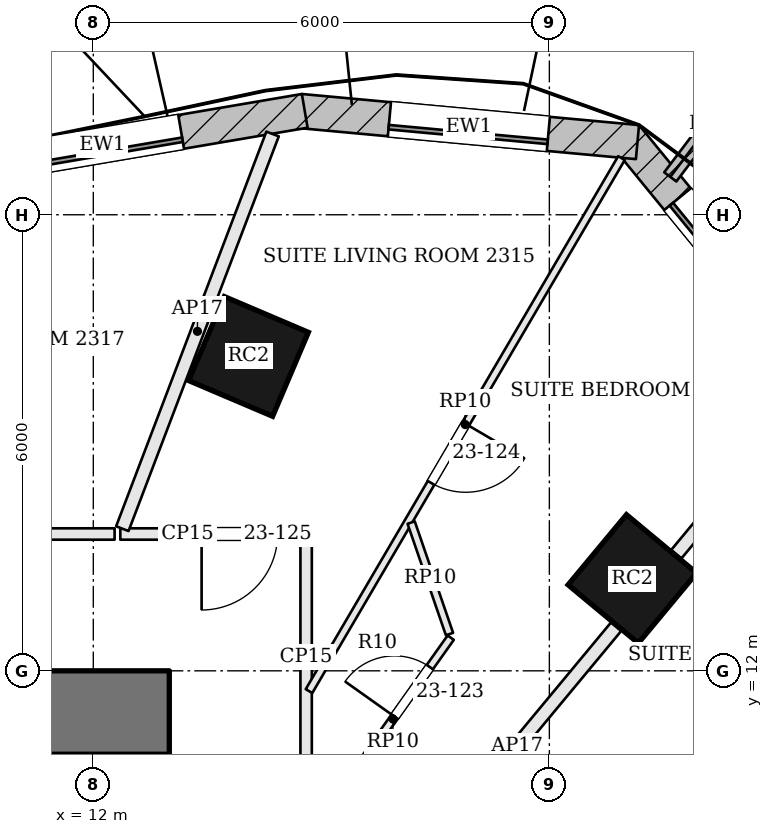
"""IFC4 building model, lengths in metres.
Left out: names, types, materials, properties, quantities, classifications, styles, units other than length and angle.
Written with IfcOpenShell. Run it as: python <this file> out.ifc"""

import sys

from ifc_helpers import new_model, si_unit, direction, frame, frame_2d, origin, origin_2d, place, context, subcontext, project, spatial, rectangle, extrude, element, fill, save


model = new_model("IFC4")
c1 = context("Model", 3, precision=1e-05, world=origin(), true_north=direction((0.0, 1.0)))
c2 = subcontext(c1, "Body", "Model", "MODEL_VIEW")
j1 = project(units=[si_unit("LENGTHUNIT", "METRE"), si_unit("PLANEANGLEUNIT", "RADIAN")], contexts=[c1])
p1 = place(None, origin())
s1 = spatial("IfcSite", under=j1, at=p1, CompositionType="ELEMENT")
p2 = place(p1, origin())
s2 = spatial("IfcBuilding", under=s1, at=p2, CompositionType="ELEMENT")
p3 = place(p2, frame((0.0, 0.0, 99.6)))
s3 = spatial("IfcBuildingStorey", under=s2, at=p3, CompositionType="ELEMENT", Elevation=99.6)
p4 = place(p3, frame((-13.0, 11.45, 0.0), z_axis=(0.0, 0.0, 1.0), x_axis=(1.0, 0.0, 0.0)))
e1 = element("IfcWall", 1, at=p4, inside=s3, PredefinedType="SHEAR", context=c2, shape_type="SweptSolid", body=[
    extrude(rectangle(XDim=26.0, YDim=1.1, at=frame_2d((13.0, 0.0))), origin(), (0.0, 0.0, 1.0), 3.6),
])
p5 = place(p4, frame((8.825, 0.0, 0.0)))
e2 = element("IfcOpeningElement", 2, at=p5, cuts=e1, PredefinedType="OPENING", context=c2, shape_type="SweptSolid", body=[
    extrude(rectangle(XDim=1.0, YDim=2.1, at=frame_2d((0.5, 1.05))), frame((0.0, 0.56, 0.0), z_axis=(0.0, -1.0, 0.0), x_axis=(1.0, 0.0, 0.0)), (0.0, 0.0, 1.0), 1.12),
])
p6 = place(p4, frame((12.1, 0.0, 0.0)))
e3 = element("IfcOpeningElement", 3, at=p6, cuts=e1, PredefinedType="OPENING", context=c2, shape_type="SweptSolid", body=[
    extrude(rectangle(XDim=1.0, YDim=2.1, at=frame_2d((0.5, 1.05))), frame((0.0, 0.56, 0.0), z_axis=(0.0, -1.0, 0.0), x_axis=(1.0, 0.0, 0.0)), (0.0, 0.0, 1.0), 1.12),
])
p7 = place(p4, frame((15.125, 0.0, 0.0)))
e4 = element("IfcOpeningElement", 4, at=p7, cuts=e1, PredefinedType="OPENING", context=c2, shape_type="SweptSolid", body=[
    extrude(rectangle(XDim=0.7, YDim=2.1, at=frame_2d((0.35, 1.05))), frame((0.0, 0.56, 0.0), z_axis=(0.0, -1.0, 0.0), x_axis=(1.0, 0.0, 0.0)), (0.0, 0.0, 1.0), 1.12),
])
p8 = place(p4, frame((16.65, 0.0, 0.0)))
e5 = element("IfcOpeningElement", 5, at=p8, cuts=e1, PredefinedType="OPENING", context=c2, shape_type="SweptSolid", body=[
    extrude(rectangle(XDim=0.9, YDim=2.1, at=frame_2d((0.45, 1.05))), frame((0.0, 0.56, 0.0), z_axis=(0.0, -1.0, 0.0), x_axis=(1.0, 0.0, 0.0)), (0.0, 0.0, 1.0), 1.12),
])
p9 = place(p3, frame((12.45, -1.9, 0.0), z_axis=(0.0, 0.0, 1.0), x_axis=(0.0, 1.0, 0.0)))
e6 = element("IfcWall", 6, at=p9, inside=s3, PredefinedType="SHEAR", context=c2, shape_type="SweptSolid", body=[
    extrude(rectangle(XDim=12.8, YDim=1.1, at=frame_2d((6.4, 0.0))), origin(), (0.0, 0.0, 1.0), 3.6),
])
p10 = place(p9, frame((7.1, 0.0, 0.0)))
e7 = element("IfcOpeningElement", 7, at=p10, cuts=e6, PredefinedType="OPENING", context=c2, shape_type="SweptSolid", body=[
    extrude(rectangle(XDim=1.8, YDim=2.1, at=frame_2d((0.9, 1.05))), frame((0.0, 0.56, 0.0), z_axis=(0.0, -1.0, 0.0), x_axis=(1.0, 0.0, 0.0)), (0.0, 0.0, 1.0), 1.12),
])
for number, where, z_axis, x_axis in (
    (8, (19.092, 13.209, 0.0), (0.0, 0.0, 1.0), (-0.769, 0.639, 0.0)),
    (9, (14.042, 16.136, 0.0), (0.0, 0.0, 1.0), (-0.92, 0.392, 0.0)),
):
    element("IfcColumn", number, at=place(p3, frame(where, z_axis=z_axis, x_axis=x_axis)), inside=s3, PredefinedType="COLUMN", context=c2, shape_type="SweptSolid", body=[
        extrude(rectangle(XDim=1.2, YDim=1.2, at=origin_2d()), origin(), (0.0, 0.0, 1.0), 3.6),
    ])
p11 = place(p3, frame((21.696, 15.748, 0.0), z_axis=(0.0, 0.0, 1.0), x_axis=(-0.632968710519, 0.774177377288, 0.0)))
e10 = element("IfcWall", 10, at=p11, inside=s3, PredefinedType="SOLIDWALL", context=c2, shape_type="SweptSolid", body=[
    extrude(rectangle(XDim=4.25, YDim=0.45, at=frame_2d((2.125, 0.0))), origin(), (0.0, 0.0, 1.0), 3.4),
])
p12 = place(p11, frame((1.075, 0.0, 0.9)))
e11 = element("IfcOpeningElement", 11, at=p12, cuts=e10, PredefinedType="OPENING", context=c2, shape_type="SweptSolid", body=[
    extrude(rectangle(XDim=2.1, YDim=2.0, at=frame_2d((1.05, 1.0))), frame((0.0, 0.235, 0.0), z_axis=(0.0, -1.0, 0.0), x_axis=(1.0, 0.0, 0.0)), (0.0, 0.0, 1.0), 0.47),
])
p13 = place(p3, frame((19.159, 18.956, 0.0), z_axis=(0.0, 0.0, 1.0), x_axis=(-0.995777399421, 0.091800712424, 0.0)))
e12 = element("IfcWall", 12, at=p13, inside=s3, PredefinedType="SOLIDWALL", context=c2, shape_type="SweptSolid", body=[
    extrude(rectangle(XDim=4.455, YDim=0.45, at=frame_2d((2.227, 0.0))), origin(), (0.0, 0.0, 1.0), 3.4),
])
p14 = place(p13, frame((1.177, 0.0, 0.9)))
e13 = element("IfcOpeningElement", 13, at=p14, cuts=e12, PredefinedType="OPENING", context=c2, shape_type="SweptSolid", body=[
    extrude(rectangle(XDim=2.1, YDim=2.0, at=frame_2d((1.05, 1.0))), frame((0.0, 0.235, 0.0), z_axis=(0.0, -1.0, 0.0), x_axis=(1.0, 0.0, 0.0)), (0.0, 0.0, 1.0), 0.47),
])
p15 = place(p3, frame((14.782, 19.367, 0.0), z_axis=(0.0, 0.0, 1.0), x_axis=(-0.98585584667, -0.167595493934, 0.0)))
e14 = element("IfcWall", 14, at=p15, inside=s3, PredefinedType="SOLIDWALL", context=c2, shape_type="SweptSolid", body=[
    extrude(rectangle(XDim=5.399, YDim=0.45, at=frame_2d((2.699, 0.0))), origin(), (0.0, 0.0, 1.0), 3.4),
])
p16 = place(p15, frame((1.649, 0.0, 0.9)))
e15 = element("IfcOpeningElement", 15, at=p16, cuts=e14, PredefinedType="OPENING", context=c2, shape_type="SweptSolid", body=[
    extrude(rectangle(XDim=2.1, YDim=2.0, at=frame_2d((1.05, 1.0))), frame((0.0, 0.235, 0.0), z_axis=(0.0, -1.0, 0.0), x_axis=(1.0, 0.0, 0.0)), (0.0, 0.0, 1.0), 0.47),
])
p17 = place(p3, frame((19.591, 18.498, 0.0), z_axis=(0.0, 0.0, 1.0), x_axis=(0.603387525063, 0.797448114048, 0.0)))
e16 = element("IfcWall", 16, at=p17, inside=s3, PredefinedType="SOLIDWALL", context=c2, shape_type="SweptSolid", body=[
    extrude(rectangle(XDim=1.75, YDim=0.2, at=frame_2d((0.875, 0.0))), origin(), (0.0, 0.0, 1.0), 3.4),
])
p18 = place(p3, frame((11.9, 10.75, 0.0), z_axis=(0.0, 0.0, 1.0), x_axis=(-1.0, 0.0, 0.0)))
e17 = element("IfcWall", 17, at=p18, inside=s3, PredefinedType="SOLIDWALL", context=c2, shape_type="SweptSolid", body=[
    extrude(rectangle(XDim=6.8, YDim=0.3, at=frame_2d((3.4, 0.0))), origin(), (0.0, 0.0, 1.0), 3.4),
])
p19 = place(p3, frame((21.453, 15.682, 0.0), z_axis=(0.0, 0.0, 1.0), x_axis=(-0.638728991457, -0.769431787407, 0.0)))
e18 = element("IfcWall", 18, at=p19, inside=s3, PredefinedType="PARTITIONING", context=c2, shape_type="SweptSolid", body=[
    extrude(rectangle(XDim=2.791, YDim=0.175, at=frame_2d((1.396, 0.0))), origin(), (0.0, 0.0, 1.0), 2.784),
])
p20 = place(p3, frame((18.878, 12.58, 0.0), z_axis=(0.0, 0.0, 1.0), x_axis=(-0.638737279584, -0.769424907102, 0.0)))
e19 = element("IfcWall", 19, at=p20, inside=s3, PredefinedType="PARTITIONING", context=c2, shape_type="SweptSolid", body=[
    extrude(rectangle(XDim=4.069, YDim=0.175, at=frame_2d((2.034, 0.0))), origin(), (0.0, 0.0, 1.0), 2.784),
])
p21 = place(p3, frame((14.8, 10.572, 0.0), z_axis=(0.0, 0.0, 1.0), x_axis=(0.0, 1.0, 0.0)))
e20 = element("IfcWall", 20, at=p21, inside=s3, PredefinedType="PARTITIONING", context=c2, shape_type="SweptSolid", body=[
    extrude(rectangle(XDim=3.228, YDim=0.15, at=frame_2d((1.614, 0.0))), origin(), (0.0, 0.0, 1.0), 2.784),
])
p22 = place(p3, frame((14.725, 13.8, 0.0), z_axis=(0.0, 0.0, 1.0), x_axis=(-1.0, 0.0, 0.0)))
e21 = element("IfcWall", 21, at=p22, inside=s3, PredefinedType="PARTITIONING", context=c2, shape_type="SweptSolid", body=[
    extrude(rectangle(XDim=2.37, YDim=0.15, at=frame_2d((1.185, 0.0))), origin(), (0.0, 0.0, 1.0), 2.784),
])
p23 = place(p22, frame((0.3, 0.0, 0.0)))
e22 = element("IfcOpeningElement", 22, at=p23, cuts=e21, PredefinedType="OPENING", context=c2, shape_type="SweptSolid", body=[
    extrude(rectangle(XDim=1.0, YDim=2.1, at=frame_2d((0.5, 1.05))), frame((0.0, 0.085, 0.0), z_axis=(0.0, -1.0, 0.0), x_axis=(1.0, 0.0, 0.0)), (0.0, 0.0, 1.0), 0.17),
])
p24 = place(p3, frame((14.359, 19.063, 0.0), z_axis=(0.0, 0.0, 1.0), x_axis=(-0.355746808742, -0.934582370939, 0.0)))
e23 = element("IfcWall", 23, at=p24, inside=s3, PredefinedType="PARTITIONING", context=c2, shape_type="SweptSolid", body=[
    extrude(rectangle(XDim=5.556, YDim=0.175, at=frame_2d((2.778, 0.0))), origin(), (0.0, 0.0, 1.0), 2.784),
])
p25 = place(p3, frame((12.281, 13.8, 0.0), z_axis=(0.0, 0.0, 1.0), x_axis=(-1.0, 0.0, 0.0)))
e24 = element("IfcWall", 24, at=p25, inside=s3, PredefinedType="PARTITIONING", context=c2, shape_type="SweptSolid", body=[
    extrude(rectangle(XDim=12.338, YDim=0.15, at=frame_2d((6.169, 0.0))), origin(), (0.0, 0.0, 1.0), 2.784),
])
p26 = place(p25, frame((9.043, 0.0, 0.0)))
e25 = element("IfcOpeningElement", 25, at=p26, cuts=e24, PredefinedType="OPENING", context=c2, shape_type="SweptSolid", body=[
    extrude(rectangle(XDim=1.0, YDim=2.1, at=frame_2d((0.5, 1.05))), frame((0.0, 0.085, 0.0), z_axis=(0.0, -1.0, 0.0), x_axis=(1.0, 0.0, 0.0)), (0.0, 0.0, 1.0), 0.17),
])
p27 = place(p3, frame((22.414, 11.576, 0.0), z_axis=(0.0, 0.0, 1.0), x_axis=(-0.77113161257, -0.636675769992, 0.0)))
e26 = element("IfcWall", 26, at=p27, inside=s3, PredefinedType="PARTITIONING", context=c2, shape_type="SweptSolid", body=[
    extrude(rectangle(XDim=5.89, YDim=0.1, at=frame_2d((2.945, 0.0))), origin(), (0.0, 0.0, 1.0), 2.784),
])
p28 = place(p27, frame((1.815, 0.0, 0.0)))
e27 = element("IfcOpeningElement", 27, at=p28, cuts=e26, PredefinedType="OPENING", context=c2, shape_type="SweptSolid", body=[
    extrude(rectangle(XDim=0.9, YDim=2.4, at=frame_2d((0.45, 1.2))), frame((0.0, 0.06, 0.0), z_axis=(0.0, -1.0, 0.0), x_axis=(1.0, 0.0, 0.0)), (0.0, 0.0, 1.0), 0.12),
])
p29 = place(p3, frame((18.949, 18.745, 0.0), z_axis=(0.0, 0.0, 1.0), x_axis=(-0.505754187447, -0.862677634972, 0.0)))
e28 = element("IfcWall", 28, at=p29, inside=s3, PredefinedType="PARTITIONING", context=c2, shape_type="SweptSolid", body=[
    extrude(rectangle(XDim=8.128, YDim=0.1, at=frame_2d((4.064, 0.0))), origin(), (0.0, 0.0, 1.0), 2.784),
])
p30 = place(p29, frame((4.053, 0.0, 0.0)))
e29 = element("IfcOpeningElement", 29, at=p30, cuts=e28, PredefinedType="OPENING", context=c2, shape_type="SweptSolid", body=[
    extrude(rectangle(XDim=0.9, YDim=2.4, at=frame_2d((0.45, 1.2))), frame((0.0, 0.06, 0.0), z_axis=(0.0, -1.0, 0.0), x_axis=(1.0, 0.0, 0.0)), (0.0, 0.0, 1.0), 0.12),
])
p31 = place(p3, frame((15.183, 10.296, 0.0), z_axis=(0.0, 0.0, 1.0), x_axis=(0.578992412459, 0.815332929738, 0.0)))
e30 = element("IfcWall", 30, at=p31, inside=s3, PredefinedType="PARTITIONING", context=c2, shape_type="SweptSolid", body=[
    extrude(rectangle(XDim=2.625, YDim=0.1, at=frame_2d((1.312, 0.0))), origin(), (0.0, 0.0, 1.0), 2.784),
])
p32 = place(p31, frame((1.35, 0.0, 0.0)))
e31 = element("IfcOpeningElement", 31, at=p32, cuts=e30, PredefinedType="OPENING", context=c2, shape_type="SweptSolid", body=[
    extrude(rectangle(XDim=0.8, YDim=2.1, at=frame_2d((0.4, 1.05))), frame((0.0, 0.06, 0.0), z_axis=(0.0, -1.0, 0.0), x_axis=(1.0, 0.0, 0.0)), (0.0, 0.0, 1.0), 0.12),
])
p33 = place(p3, frame((16.686, 12.484, 0.0), z_axis=(0.0, 0.0, 1.0), x_axis=(-0.325136945244, 0.94566694287, 0.0)))
e32 = element("IfcWall", 32, at=p33, inside=s3, PredefinedType="PARTITIONING", context=c2, shape_type="SweptSolid", body=[
    extrude(rectangle(XDim=1.551, YDim=0.1, at=frame_2d((0.776, 0.0))), origin(), (0.0, 0.0, 1.0), 2.784),
])
p34 = place(p12, origin())
e33 = element("IfcWindow", 33, at=p34, inside=s3, PartitioningType="SINGLE_PANEL", PredefinedType="WINDOW", context=c2, shape_type="SweptSolid", body=[
    extrude(rectangle(XDim=2.1, YDim=2.0, at=frame_2d((1.05, 1.0))), frame((0.0, 0.135, 0.0), z_axis=(0.0, -1.0, 0.0), x_axis=(1.0, 0.0, 0.0)), (0.0, 0.0, 1.0), 0.06),
])
fill(e11, e33)
p35 = place(p14, origin())
e34 = element("IfcWindow", 34, at=p35, inside=s3, PartitioningType="SINGLE_PANEL", PredefinedType="WINDOW", context=c2, shape_type="SweptSolid", body=[
    extrude(rectangle(XDim=2.1, YDim=2.0, at=frame_2d((1.05, 1.0))), frame((0.0, 0.135, 0.0), z_axis=(0.0, -1.0, 0.0), x_axis=(1.0, 0.0, 0.0)), (0.0, 0.0, 1.0), 0.06),
])
fill(e13, e34)
p36 = place(p16, origin())
e35 = element("IfcWindow", 35, at=p36, inside=s3, PartitioningType="SINGLE_PANEL", PredefinedType="WINDOW", context=c2, shape_type="SweptSolid", body=[
    extrude(rectangle(XDim=2.1, YDim=2.0, at=frame_2d((1.05, 1.0))), frame((0.0, 0.135, 0.0), z_axis=(0.0, -1.0, 0.0), x_axis=(1.0, 0.0, 0.0)), (0.0, 0.0, 1.0), 0.06),
])
fill(e15, e35)
p37 = place(p32, origin())
e36 = element("IfcDoor", 36, at=p37, inside=s3, OperationType="SINGLE_SWING_LEFT", PredefinedType="DOOR", context=c2, shape_type="SweptSolid", body=[
    extrude(rectangle(XDim=0.8, YDim=2.1, at=frame_2d((0.4, 1.05))), frame((0.0, 0.025, 0.0), z_axis=(0.0, -1.0, 0.0), x_axis=(1.0, 0.0, 0.0)), (0.0, 0.0, 1.0), 0.05),
])
fill(e31, e36)
p38 = place(p30, origin())
e37 = element("IfcDoor", 37, at=p38, inside=s3, OperationType="SINGLE_SWING_LEFT", PredefinedType="DOOR", context=c2, shape_type="SweptSolid", body=[
    extrude(rectangle(XDim=0.9, YDim=2.4, at=frame_2d((0.45, 1.2))), frame((0.0, 0.025, 0.0), z_axis=(0.0, -1.0, 0.0), x_axis=(1.0, 0.0, 0.0)), (0.0, 0.0, 1.0), 0.05),
])
fill(e29, e37)
p39 = place(p23, origin())
e38 = element("IfcDoor", 38, at=p39, inside=s3, OperationType="SINGLE_SWING_RIGHT", PredefinedType="DOOR", context=c2, shape_type="SweptSolid", body=[
    extrude(rectangle(XDim=1.0, YDim=2.1, at=frame_2d((0.5, 1.05))), frame((0.0, 0.025, 0.0), z_axis=(0.0, -1.0, 0.0), x_axis=(1.0, 0.0, 0.0)), (0.0, 0.0, 1.0), 0.05),
])
fill(e22, e38)
save(model, sys.argv[1])
